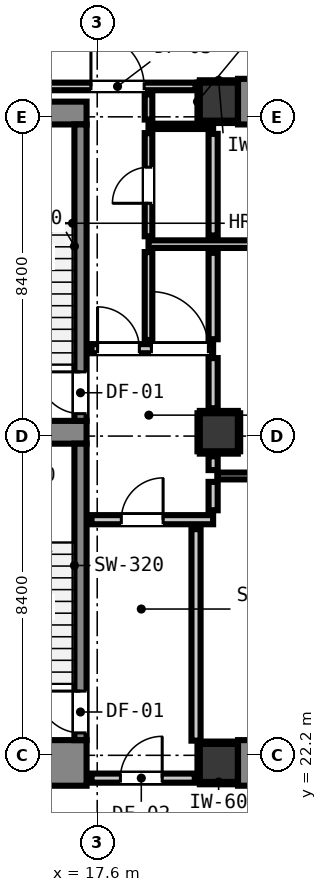
"""IFC4 building model, lengths in metres.
Left out: names, types, materials, properties, quantities, classifications, styles, units other than length and angle.
Written with IfcOpenShell. Run it as: python <this file> out.ifc"""

import sys

from ifc_helpers import new_model, si_unit, direction, frame, frame_2d, origin, origin_2d, place, context, subcontext, project, spatial, rectangle, extrude, element, fill, save


model = new_model("IFC4")
c1 = context("Model", 3, precision=1e-05, world=origin(), true_north=direction((0.0, 1.0)))
c2 = subcontext(c1, "Body", "Model", "MODEL_VIEW")
j1 = project(units=[si_unit("LENGTHUNIT", "METRE"), si_unit("PLANEANGLEUNIT", "RADIAN")], contexts=[c1])
p1 = place(None, origin())
s1 = spatial("IfcSite", under=j1, at=p1, CompositionType="ELEMENT")
p2 = place(p1, origin())
s2 = spatial("IfcBuilding", under=s1, at=p2, CompositionType="ELEMENT")
p3 = place(p2, frame((0.0, 0.0, -13.2)))
s3 = spatial("IfcBuildingStorey", under=s2, at=p3, CompositionType="ELEMENT", Elevation=-13.2)
for number, where, z_axis, x_axis in (
    (1, (20.8, 22.0, -0.4), (0.0, 0.0, 1.0), (1.0, 0.0, 0.0)),
    (2, (20.8, 39.4, -0.4), (0.0, 0.0, 1.0), (1.0, 0.0, 0.0)),
):
    element("IfcColumn", number, at=place(p3, frame(where, z_axis=z_axis, x_axis=x_axis)), inside=s3, PredefinedType="COLUMN", context=c2, shape_type="SweptSolid", body=[
        extrude(rectangle(XDim=1.0, YDim=1.0, at=origin_2d()), origin(), (0.0, 0.0, 1.0), 4.8),
    ])
p4 = place(p3, frame((13.24, 22.0, 0.0), z_axis=(0.0, 0.0, 1.0), x_axis=(1.0, 0.0, 0.0)))
e3 = element("IfcWall", 3, at=p4, inside=s3, PredefinedType="SHEAR", context=c2, shape_type="SweptSolid", body=[
    extrude(rectangle(XDim=4.08, YDim=1.2, at=frame_2d((2.04, 0.0))), origin(), (0.0, 0.0, 1.0), 4.4),
])
p5 = place(p3, frame((13.24, 39.1, 0.0), z_axis=(0.0, 0.0, 1.0), x_axis=(1.0, 0.0, 0.0)))
e4 = element("IfcWall", 4, at=p5, inside=s3, PredefinedType="SHEAR", context=c2, shape_type="SweptSolid", body=[
    extrude(rectangle(XDim=4.08, YDim=0.6, at=frame_2d((2.04, 0.0))), origin(), (0.0, 0.0, 1.0), 4.4),
])
p6 = place(p3, frame((13.905, 30.7, 0.0), z_axis=(0.0, 0.0, 1.0), x_axis=(1.0, 0.0, 0.0)))
e5 = element("IfcWall", 5, at=p6, inside=s3, PredefinedType="SHEAR", context=c2, shape_type="SweptSolid", body=[
    extrude(rectangle(XDim=3.415, YDim=0.6, at=frame_2d((1.708, 0.0))), origin(), (0.0, 0.0, 1.0), 4.4),
])
for number, where, z_axis, x_axis in (
    (6, (21.305, 22.0, 0.0), (0.0, 0.0, 1.0), (1.0, 0.0, 0.0)),
    (7, (21.305, 39.4, 0.0), (0.0, 0.0, 1.0), (1.0, 0.0, 0.0)),
):
    element("IfcWall", number, at=place(p3, frame(where, z_axis=z_axis, x_axis=x_axis)), inside=s3, PredefinedType="SHEAR", context=c2, shape_type="SweptSolid", body=[
        extrude(rectangle(XDim=7.39, YDim=1.2, at=frame_2d((3.695, 0.0))), origin(), (0.0, 0.0, 1.0), 4.4),
    ])
p7 = place(p3, frame((17.16, 31.0, 0.0), z_axis=(0.0, 0.0, 1.0), x_axis=(0.0, 1.0, 0.0)))
e8 = element("IfcWall", 8, at=p7, inside=s3, PredefinedType="SHEAR", context=c2, shape_type="SweptSolid", body=[
    extrude(rectangle(XDim=7.8, YDim=0.32, at=frame_2d((3.9, 0.0))), origin(), (0.0, 0.0, 1.0), 4.4),
])
p8 = place(p7, frame((0.19, 0.0, 0.0)))
e9 = element("IfcOpeningElement", 9, at=p8, cuts=e8, PredefinedType="OPENING", context=c2, shape_type="SweptSolid", body=[
    extrude(rectangle(XDim=1.1, YDim=2.15, at=frame_2d((0.55, 1.075))), frame((0.0, 0.17, 0.0), z_axis=(0.0, -1.0, 0.0), x_axis=(1.0, 0.0, 0.0)), (0.0, 0.0, 1.0), 0.34),
])
p9 = place(p3, frame((17.16, 22.6, 0.0), z_axis=(0.0, 0.0, 1.0), x_axis=(0.0, 1.0, 0.0)))
e10 = element("IfcWall", 10, at=p9, inside=s3, PredefinedType="SHEAR", context=c2, shape_type="SweptSolid", body=[
    extrude(rectangle(XDim=7.8, YDim=0.32, at=frame_2d((3.9, 0.0))), origin(), (0.0, 0.0, 1.0), 4.4),
])
p10 = place(p9, frame((0.19, 0.0, 0.0)))
e11 = element("IfcOpeningElement", 11, at=p10, cuts=e10, PredefinedType="OPENING", context=c2, shape_type="SweptSolid", body=[
    extrude(rectangle(XDim=1.1, YDim=2.15, at=frame_2d((0.55, 1.075))), frame((0.0, 0.17, 0.0), z_axis=(0.0, -1.0, 0.0), x_axis=(1.0, 0.0, 0.0)), (0.0, 0.0, 1.0), 0.34),
])
p11 = place(p3, frame((20.8, 30.7, -0.4), z_axis=(0.0, 0.0, 1.0), x_axis=(1.0, 0.0, 0.0)))
e12 = element("IfcColumn", 12, at=p11, inside=s3, PredefinedType="COLUMN", context=c2, shape_type="SweptSolid", body=[
    extrude(rectangle(XDim=1.0, YDim=1.0, at=origin_2d()), origin(), (0.0, 0.0, 1.0), 4.8),
])
p12 = place(p3, frame((17.45, 21.6, 0.0), z_axis=(0.0, 0.0, 1.0), x_axis=(1.0, 0.0, 0.0)))
e13 = element("IfcWall", 13, at=p12, inside=s3, PredefinedType="PARTITIONING", context=c2, shape_type="SweptSolid", body=[
    extrude(rectangle(XDim=2.718, YDim=0.24, at=frame_2d((1.359, 0.0))), origin(), (0.0, 0.0, 1.0), 3.335),
])
p13 = place(p12, frame((0.76, 0.0, 0.0)))
e14 = element("IfcOpeningElement", 14, at=p13, cuts=e13, PredefinedType="OPENING", context=c2, shape_type="SweptSolid", body=[
    extrude(rectangle(XDim=1.1, YDim=2.15, at=frame_2d((0.55, 1.075))), frame((0.0, 0.13, 0.0), z_axis=(0.0, -1.0, 0.0), x_axis=(1.0, 0.0, 0.0)), (0.0, 0.0, 1.0), 0.26),
])
p14 = place(p3, frame((17.45, 28.4, 0.0), z_axis=(0.0, 0.0, 1.0), x_axis=(1.0, 0.0, 0.0)))
e15 = element("IfcWall", 15, at=p14, inside=s3, PredefinedType="PARTITIONING", context=c2, shape_type="SweptSolid", body=[
    extrude(rectangle(XDim=3.2, YDim=0.24, at=frame_2d((1.6, 0.0))), origin(), (0.0, 0.0, 1.0), 4.1),
])
p15 = place(p14, frame((0.784, 0.0, 0.0)))
e16 = element("IfcOpeningElement", 16, at=p15, cuts=e15, PredefinedType="OPENING", context=c2, shape_type="SweptSolid", body=[
    extrude(rectangle(XDim=1.1, YDim=2.15, at=frame_2d((0.55, 1.075))), frame((0.0, 0.13, 0.0), z_axis=(0.0, -1.0, 0.0), x_axis=(1.0, 0.0, 0.0)), (0.0, 0.0, 1.0), 0.26),
])
p16 = place(p3, frame((17.45, 32.9, 0.0), z_axis=(0.0, 0.0, 1.0), x_axis=(1.0, 0.0, 0.0)))
e17 = element("IfcWall", 17, at=p16, inside=s3, PredefinedType="PARTITIONING", context=c2, shape_type="SweptSolid", body=[
    extrude(rectangle(XDim=3.2, YDim=0.24, at=frame_2d((1.6, 0.0))), origin(), (0.0, 0.0, 1.0), 4.1),
])
p17 = place(p16, frame((0.159, 0.0, 0.0)))
e18 = element("IfcOpeningElement", 18, at=p17, cuts=e17, PredefinedType="OPENING", context=c2, shape_type="SweptSolid", body=[
    extrude(rectangle(XDim=1.1, YDim=2.15, at=frame_2d((0.55, 1.075))), frame((0.0, 0.13, 0.0), z_axis=(0.0, -1.0, 0.0), x_axis=(1.0, 0.0, 0.0)), (0.0, 0.0, 1.0), 0.26),
])
p18 = place(p16, frame((1.576, 0.0, 0.0)))
e19 = element("IfcOpeningElement", 19, at=p18, cuts=e17, PredefinedType="OPENING", context=c2, shape_type="SweptSolid", body=[
    extrude(rectangle(XDim=1.5, YDim=2.15, at=frame_2d((0.75, 1.075))), frame((0.0, 0.13, 0.0), z_axis=(0.0, -1.0, 0.0), x_axis=(1.0, 0.0, 0.0)), (0.0, 0.0, 1.0), 0.26),
])
p19 = place(p3, frame((18.95, 35.65, 0.0), z_axis=(0.0, 0.0, 1.0), x_axis=(1.0, 0.0, 0.0)))
e20 = element("IfcWall", 20, at=p19, inside=s3, PredefinedType="PARTITIONING", context=c2, shape_type="SweptSolid", body=[
    extrude(rectangle(XDim=11.025, YDim=0.2, at=frame_2d((5.513, 0.0))), origin(), (0.0, 0.0, 1.0), 4.1),
])
p20 = place(p3, frame((6.312, 39.8, 0.0), z_axis=(0.0, 0.0, 1.0), x_axis=(1.0, 0.0, 0.0)))
e21 = element("IfcWall", 21, at=p20, inside=s3, PredefinedType="PARTITIONING", context=c2, shape_type="SweptSolid", body=[
    extrude(rectangle(XDim=13.876, YDim=0.2, at=frame_2d((6.938, 0.0))), origin(), (0.0, 0.0, 1.0), 3.335),
])
p21 = place(p20, frame((11.123, 0.0, 0.0)))
e22 = element("IfcOpeningElement", 22, at=p21, cuts=e21, PredefinedType="OPENING", context=c2, shape_type="SweptSolid", body=[
    extrude(rectangle(XDim=1.4, YDim=2.15, at=frame_2d((0.7, 1.075))), frame((0.0, 0.11, 0.0), z_axis=(0.0, -1.0, 0.0), x_axis=(1.0, 0.0, 0.0)), (0.0, 0.0, 1.0), 0.22),
])
p22 = place(p20, frame((4.512, 0.0, 0.0)))
e23 = element("IfcOpeningElement", 23, at=p22, cuts=e21, PredefinedType="OPENING", context=c2, shape_type="SweptSolid", body=[
    extrude(rectangle(XDim=1.4, YDim=2.15, at=frame_2d((0.7, 1.075))), frame((0.0, 0.11, 0.0), z_axis=(0.0, -1.0, 0.0), x_axis=(1.0, 0.0, 0.0)), (0.0, 0.0, 1.0), 0.22),
])
p23 = place(p3, frame((20.76, 29.55, 0.0), z_axis=(0.0, 0.0, 1.0), x_axis=(1.0, 0.0, 0.0)))
e24 = element("IfcWall", 24, at=p23, inside=s3, PredefinedType="PARTITIONING", context=c2, shape_type="SweptSolid", body=[
    extrude(rectangle(XDim=8.48, YDim=0.18, at=frame_2d((4.24, 0.0))), origin(), (0.0, 0.0, 1.0), 3.135),
])
p24 = place(p3, frame((18.95, 38.75, 0.0), z_axis=(0.0, 0.0, 1.0), x_axis=(1.0, 0.0, 0.0)))
e25 = element("IfcWall", 25, at=p24, inside=s3, PredefinedType="PARTITIONING", context=c2, shape_type="SweptSolid", body=[
    extrude(rectangle(XDim=1.7, YDim=0.14, at=frame_2d((0.85, 0.0))), origin(), (0.0, 0.0, 1.0), 4.1),
])
p25 = place(p3, frame((20.2, 22.586, 0.0), z_axis=(0.0, 0.0, 1.0), x_axis=(0.0, 1.0, 0.0)))
e26 = element("IfcWall", 26, at=p25, inside=s3, PredefinedType="PARTITIONING", context=c2, shape_type="SweptSolid", body=[
    extrude(rectangle(XDim=5.566, YDim=0.24, at=frame_2d((2.783, 0.0))), origin(), (0.0, 0.0, 1.0), 4.1),
])
p26 = place(p3, frame((20.65, 28.648, 0.0), z_axis=(0.0, 0.0, 1.0), x_axis=(0.0, 1.0, 0.0)))
e27 = element("IfcWall", 27, at=p26, inside=s3, PredefinedType="PARTITIONING", context=c2, shape_type="SweptSolid", body=[
    extrude(rectangle(XDim=0.747, YDim=0.24, at=frame_2d((0.374, 0.0))), origin(), (0.0, 0.0, 1.0), 3.135),
])
p27 = place(p3, frame((20.65, 29.705, 0.0), z_axis=(0.0, 0.0, 1.0), x_axis=(0.0, 1.0, 0.0)))
e28 = element("IfcWall", 28, at=p27, inside=s3, PredefinedType="PARTITIONING", context=c2, shape_type="SweptSolid", body=[
    extrude(rectangle(XDim=0.363, YDim=0.24, at=frame_2d((0.182, 0.0))), origin(), (0.0, 0.0, 1.0), 3.135),
])
p28 = place(p3, frame((20.65, 31.332, 0.0), z_axis=(0.0, 0.0, 1.0), x_axis=(0.0, 1.0, 0.0)))
e29 = element("IfcWall", 29, at=p28, inside=s3, PredefinedType="PARTITIONING", context=c2, shape_type="SweptSolid", body=[
    extrude(rectangle(XDim=1.32, YDim=0.24, at=frame_2d((0.66, 0.0))), origin(), (0.0, 0.0, 1.0), 3.135),
])
p29 = place(p3, frame((20.65, 33.148, 0.0), z_axis=(0.0, 0.0, 1.0), x_axis=(0.0, 1.0, 0.0)))
e30 = element("IfcWall", 30, at=p29, inside=s3, PredefinedType="PARTITIONING", context=c2, shape_type="SweptSolid", body=[
    extrude(rectangle(XDim=2.274, YDim=0.24, at=frame_2d((1.137, 0.0))), origin(), (0.0, 0.0, 1.0), 3.135),
])
p30 = place(p3, frame((20.65, 35.878, 0.0), z_axis=(0.0, 0.0, 1.0), x_axis=(0.0, 1.0, 0.0)))
e31 = element("IfcWall", 31, at=p30, inside=s3, PredefinedType="PARTITIONING", context=c2, shape_type="SweptSolid", body=[
    extrude(rectangle(XDim=2.674, YDim=0.24, at=frame_2d((1.337, 0.0))), origin(), (0.0, 0.0, 1.0), 3.135),
])
p31 = place(p3, frame((18.95, 33.128, 0.0), z_axis=(0.0, 0.0, 1.0), x_axis=(0.0, 1.0, 0.0)))
e32 = element("IfcWall", 32, at=p31, inside=s3, PredefinedType="PARTITIONING", context=c2, shape_type="SweptSolid", body=[
    extrude(rectangle(XDim=2.314, YDim=0.2, at=frame_2d((1.157, 0.0))), origin(), (0.0, 0.0, 1.0), 4.1),
])
p32 = place(p3, frame((18.95, 35.858, 0.0), z_axis=(0.0, 0.0, 1.0), x_axis=(0.0, 1.0, 0.0)))
e33 = element("IfcWall", 33, at=p32, inside=s3, PredefinedType="PARTITIONING", context=c2, shape_type="SweptSolid", body=[
    extrude(rectangle(XDim=2.714, YDim=0.2, at=frame_2d((1.357, 0.0))), origin(), (0.0, 0.0, 1.0), 4.1),
])
p33 = place(p32, frame((0.867, 0.0, 0.0)))
e34 = element("IfcOpeningElement", 34, at=p33, cuts=e33, PredefinedType="OPENING", context=c2, shape_type="SweptSolid", body=[
    extrude(rectangle(XDim=0.95, YDim=2.1, at=frame_2d((0.475, 1.05))), frame((0.0, 0.11, 0.0), z_axis=(0.0, -1.0, 0.0), x_axis=(1.0, 0.0, 0.0)), (0.0, 0.0, 1.0), 0.22),
])
p34 = place(p3, frame((18.95, 38.928, 0.0), z_axis=(0.0, 0.0, 1.0), x_axis=(0.0, 1.0, 0.0)))
e35 = element("IfcWall", 35, at=p34, inside=s3, PredefinedType="PARTITIONING", context=c2, shape_type="SweptSolid", body=[
    extrude(rectangle(XDim=0.664, YDim=0.2, at=frame_2d((0.332, 0.0))), origin(), (0.0, 0.0, 1.0), 4.1),
])
for number, where, z_axis, x_axis in (
    (36, (20.3, 21.468, 0.0), (0.0, 0.0, 1.0), (1.0, 0.0, 0.0)),
    (37, (20.3, 22.532, 0.0), (0.0, 0.0, 1.0), (1.0, 0.0, 0.0)),
):
    element("IfcWall", number, at=place(p3, frame(where, z_axis=z_axis, x_axis=x_axis)), inside=s3, PredefinedType="PARTITIONING", context=c2, shape_type="SweptSolid", body=[
        extrude(rectangle(XDim=0.99, YDim=0.06, at=frame_2d((0.495, 0.0))), origin(), (0.0, 0.0, 1.0), 1.45),
    ])
p35 = place(p3, frame((20.268, 21.5, 0.0), z_axis=(0.0, 0.0, 1.0), x_axis=(0.0, 1.0, 0.0)))
e38 = element("IfcWall", 38, at=p35, inside=s3, PredefinedType="PARTITIONING", context=c2, shape_type="SweptSolid", body=[
    extrude(rectangle(XDim=1.0, YDim=0.06, at=frame_2d((0.5, 0.0))), origin(), (0.0, 0.0, 1.0), 1.45),
])
for number, where, z_axis, x_axis in (
    (39, (20.3, 38.868, 0.0), (0.0, 0.0, 1.0), (1.0, 0.0, 0.0)),
    (40, (20.3, 39.932, 0.0), (0.0, 0.0, 1.0), (1.0, 0.0, 0.0)),
):
    element("IfcWall", number, at=place(p3, frame(where, z_axis=z_axis, x_axis=x_axis)), inside=s3, PredefinedType="PARTITIONING", context=c2, shape_type="SweptSolid", body=[
        extrude(rectangle(XDim=0.99, YDim=0.06, at=frame_2d((0.495, 0.0))), origin(), (0.0, 0.0, 1.0), 1.45),
    ])
for number, where, z_axis, x_axis in (
    (41, (20.268, 38.9, 0.0), (0.0, 0.0, 1.0), (0.0, 1.0, 0.0)),
    (42, (20.3, 30.168, 0.0), (0.0, 0.0, 1.0), (1.0, 0.0, 0.0)),
    (43, (20.3, 31.232, 0.0), (0.0, 0.0, 1.0), (1.0, 0.0, 0.0)),
    (44, (20.268, 30.2, 0.0), (0.0, 0.0, 1.0), (0.0, 1.0, 0.0)),
    (45, (21.332, 30.2, 0.0), (0.0, 0.0, 1.0), (0.0, 1.0, 0.0)),
):
    element("IfcWall", number, at=place(p3, frame(where, z_axis=z_axis, x_axis=x_axis)), inside=s3, PredefinedType="PARTITIONING", context=c2, shape_type="SweptSolid", body=[
        extrude(rectangle(XDim=1.0, YDim=0.06, at=frame_2d((0.5, 0.0))), origin(), (0.0, 0.0, 1.0), 1.45),
    ])
p36 = place(p8, origin())
e46 = element("IfcDoor", 46, at=p36, inside=s3, OperationType="SINGLE_SWING_RIGHT", PredefinedType="DOOR", context=c2, shape_type="SweptSolid", body=[
    extrude(rectangle(XDim=1.1, YDim=2.15, at=frame_2d((0.55, 1.075))), frame((0.0, 0.025, 0.0), z_axis=(0.0, -1.0, 0.0), x_axis=(1.0, 0.0, 0.0)), (0.0, 0.0, 1.0), 0.05),
])
fill(e9, e46)
p37 = place(p10, origin())
e47 = element("IfcDoor", 47, at=p37, inside=s3, OperationType="SINGLE_SWING_RIGHT", PredefinedType="DOOR", context=c2, shape_type="SweptSolid", body=[
    extrude(rectangle(XDim=1.1, YDim=2.15, at=frame_2d((0.55, 1.075))), frame((0.0, 0.025, 0.0), z_axis=(0.0, -1.0, 0.0), x_axis=(1.0, 0.0, 0.0)), (0.0, 0.0, 1.0), 0.05),
])
fill(e11, e47)
p38 = place(p15, origin())
e48 = element("IfcDoor", 48, at=p38, inside=s3, OperationType="SINGLE_SWING_RIGHT", PredefinedType="DOOR", context=c2, shape_type="SweptSolid", body=[
    extrude(rectangle(XDim=1.1, YDim=2.15, at=frame_2d((0.55, 1.075))), frame((0.0, 0.025, 0.0), z_axis=(0.0, -1.0, 0.0), x_axis=(1.0, 0.0, 0.0)), (0.0, 0.0, 1.0), 0.05),
])
fill(e16, e48)
p39 = place(p17, origin())
e49 = element("IfcDoor", 49, at=p39, inside=s3, OperationType="SINGLE_SWING_LEFT", PredefinedType="DOOR", context=c2, shape_type="SweptSolid", body=[
    extrude(rectangle(XDim=1.1, YDim=2.15, at=frame_2d((0.55, 1.075))), frame((0.0, 0.025, 0.0), z_axis=(0.0, -1.0, 0.0), x_axis=(1.0, 0.0, 0.0)), (0.0, 0.0, 1.0), 0.05),
])
fill(e18, e49)
p40 = place(p13, origin())
e50 = element("IfcDoor", 50, at=p40, inside=s3, OperationType="SINGLE_SWING_RIGHT", PredefinedType="DOOR", context=c2, shape_type="SweptSolid", body=[
    extrude(rectangle(XDim=1.1, YDim=2.15, at=frame_2d((0.55, 1.075))), frame((0.0, 0.025, 0.0), z_axis=(0.0, -1.0, 0.0), x_axis=(1.0, 0.0, 0.0)), (0.0, 0.0, 1.0), 0.05),
])
fill(e14, e50)
p41 = place(p21, origin())
e51 = element("IfcDoor", 51, at=p41, inside=s3, OperationType="SINGLE_SWING_LEFT", PredefinedType="DOOR", context=c2, shape_type="SweptSolid", body=[
    extrude(rectangle(XDim=1.4, YDim=2.15, at=frame_2d((0.7, 1.075))), frame((0.0, 0.025, 0.0), z_axis=(0.0, -1.0, 0.0), x_axis=(1.0, 0.0, 0.0)), (0.0, 0.0, 1.0), 0.05),
])
fill(e22, e51)
p42 = place(p18, origin())
e52 = element("IfcDoor", 52, at=p42, inside=s3, OperationType="SINGLE_SWING_LEFT", PredefinedType="DOOR", context=c2, shape_type="SweptSolid", body=[
    extrude(rectangle(XDim=1.5, YDim=2.15, at=frame_2d((0.75, 1.075))), frame((0.0, 0.025, 0.0), z_axis=(0.0, -1.0, 0.0), x_axis=(1.0, 0.0, 0.0)), (0.0, 0.0, 1.0), 0.05),
])
fill(e19, e52)
p43 = place(p33, origin())
e53 = element("IfcDoor", 53, at=p43, inside=s3, OperationType="SINGLE_SWING_LEFT", PredefinedType="DOOR", context=c2, shape_type="SweptSolid", body=[
    extrude(rectangle(XDim=0.95, YDim=2.1, at=frame_2d((0.475, 1.05))), frame((0.0, 0.025, 0.0), z_axis=(0.0, -1.0, 0.0), x_axis=(1.0, 0.0, 0.0)), (0.0, 0.0, 1.0), 0.05),
])
fill(e34, e53)
save(model, sys.argv[1])
